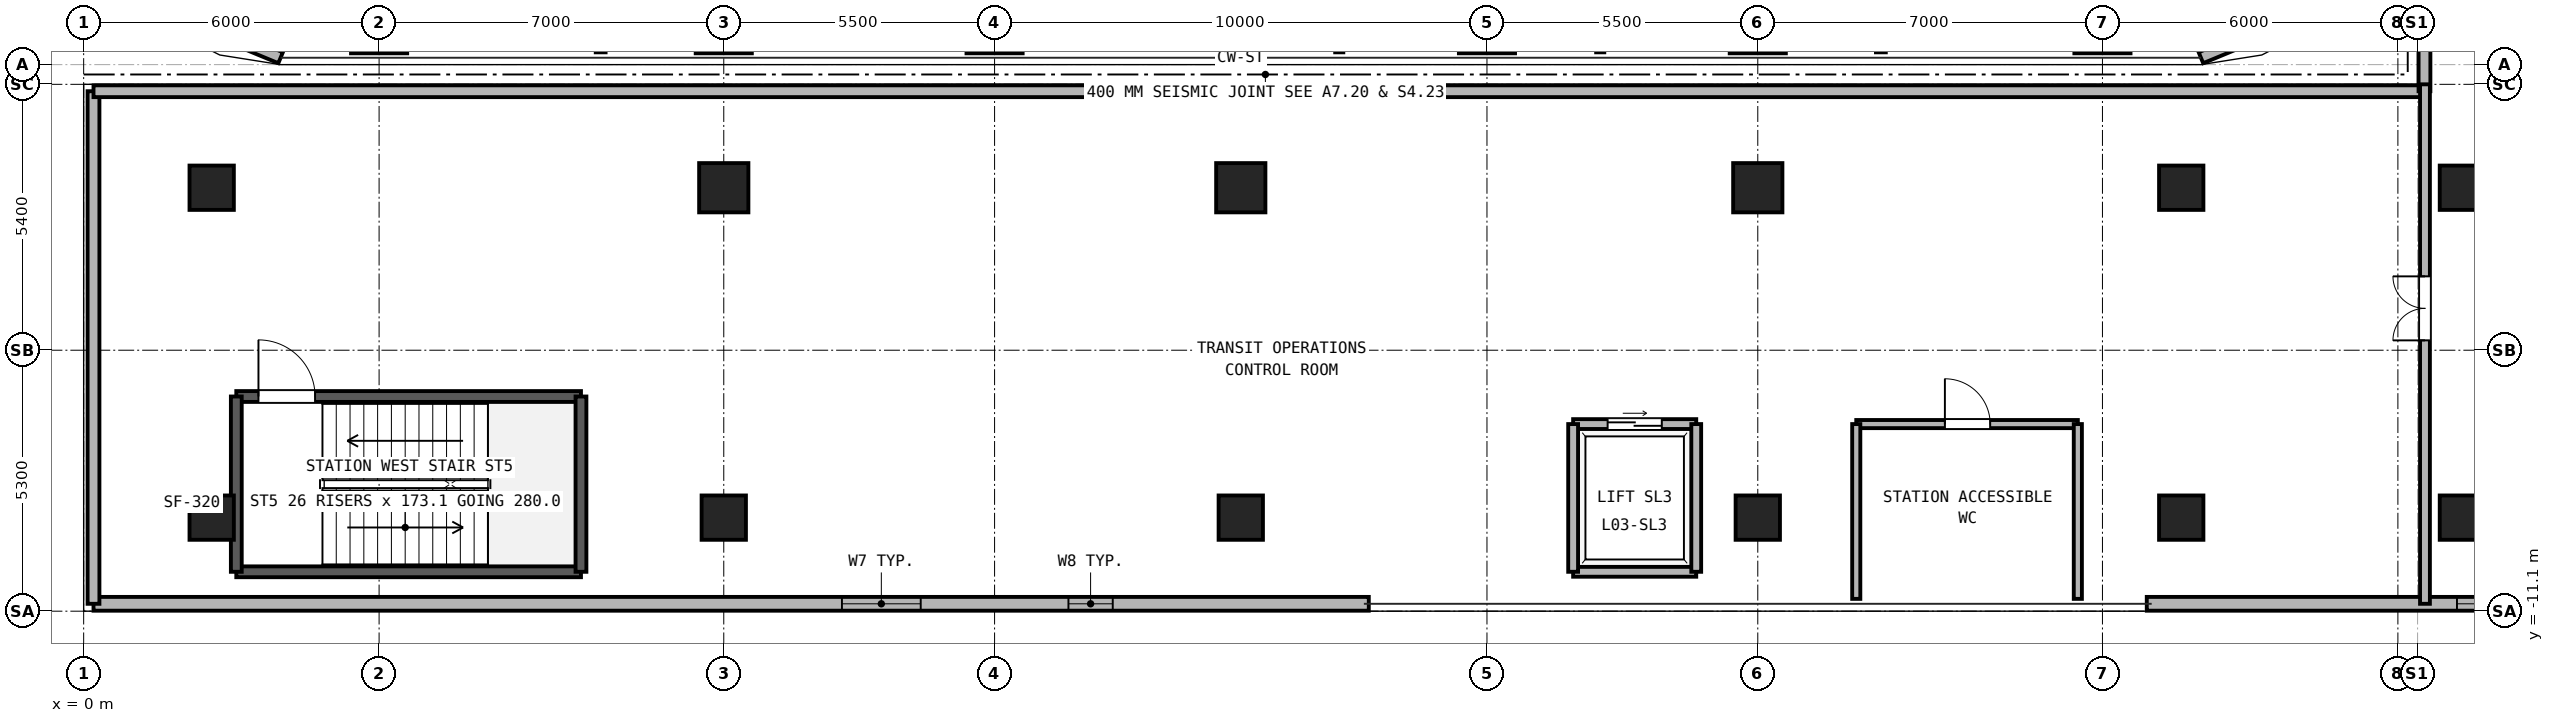
"""IFC4 building model, lengths in metres.
Left out: names, types, materials, properties, quantities, classifications, styles, units other than length and angle.
Written with IfcOpenShell. Run it as: python <this file> out.ifc"""

import sys

from ifc_helpers import new_model, si_unit, direction, frame, frame_2d, origin, origin_2d, place, context, subcontext, project, spatial, rectangle, hollow_rectangle, circle, extrude, source, transform, mapped, element, fill, save


model = new_model("IFC4")
c1 = context("Model", 3, precision=1e-05, world=origin(), true_north=direction((0.0, 1.0)))
c2 = subcontext(c1, "Body", "Model", "MODEL_VIEW")
j1 = project(units=[si_unit("LENGTHUNIT", "METRE"), si_unit("PLANEANGLEUNIT", "RADIAN")], contexts=[c1])
p1 = place(None, origin())
s1 = spatial("IfcSite", under=j1, at=p1, CompositionType="ELEMENT")
p2 = place(p1, origin())
s2 = spatial("IfcBuilding", under=s1, at=p2, CompositionType="ELEMENT")
p3 = place(p2, frame((0.0, 0.0, 13.5)))
s3 = spatial("IfcBuildingStorey", under=s2, at=p3, CompositionType="ELEMENT", Elevation=13.5)
m1 = source(origin(), c2, "Body", "SweptSolid", [
    extrude(hollow_rectangle(XDim=1.14, YDim=1.14, WallThickness=0.07, at=origin_2d()), origin(), (0.0, 0.0, 1.0), 4.18),
])
for number, where, z_axis, x_axis in (
    (1, (6.0, 0.8, 0.0), (0.0, 0.0, 1.0), (1.0, 0.0, 0.0)),
    (2, (13.0, 0.8, 0.0), (0.0, 0.0, 1.0), (1.0, 0.0, 0.0)),
    (3, (18.5, 0.8, 0.0), (0.0, 0.0, 1.0), (1.0, 0.0, 0.0)),
    (4, (28.5, 0.8, 0.0), (0.0, 0.0, 1.0), (1.0, 0.0, 0.0)),
    (5, (34.0, 0.8, 0.0), (0.0, 0.0, 1.0), (1.0, 0.0, 0.0)),
    (6, (41.0, 0.8, 0.0), (0.0, 0.0, 1.0), (1.0, 0.0, 0.0)),
):
    element("IfcColumn", number, at=place(p3, frame(where, z_axis=z_axis, x_axis=x_axis)), inside=s3, PredefinedType="COLUMN", context=c2, shape_type="MappedRepresentation", body=[
        mapped(m1, transform((0.0, 0.0, 0.0), x_axis=(1.0, 0.0, 0.0), y_axis=(0.0, 1.0, 0.0), z_axis=(0.0, 0.0, 1.0), scale=1.0)),
    ])
m2 = source(origin(), c2, "Body", "SweptSolid", [
    extrude(hollow_rectangle(XDim=0.7, YDim=0.9, WallThickness=0.04, at=origin_2d()), origin(), (0.0, 0.0, 1.0), 4.18),
])
for number, where, z_axis, x_axis in (
    (7, (2.6, -9.2, 0.0), (0.0, 0.0, 1.0), (1.0, 0.0, 0.0)),
    (8, (2.6, -2.5, 0.0), (0.0, 0.0, 1.0), (1.0, 0.0, 0.0)),
    (9, (13.0, -9.2, 0.0), (0.0, 0.0, 1.0), (1.0, 0.0, 0.0)),
):
    element("IfcColumn", number, at=place(p3, frame(where, z_axis=z_axis, x_axis=x_axis)), inside=s3, PredefinedType="COLUMN", context=c2, shape_type="MappedRepresentation", body=[
        mapped(m2, transform((0.0, 0.0, 0.0), x_axis=(1.0, 0.0, 0.0), y_axis=(0.0, 1.0, 0.0), z_axis=(0.0, 0.0, 1.0), scale=1.0)),
    ])
m3 = source(origin(), c2, "Body", "SweptSolid", [
    extrude(circle(Radius=0.5, at=origin_2d()), origin(), (0.0, 0.0, 1.0), 4.18),
])
p4 = place(p3, frame((13.0, -2.5, 0.0), z_axis=(0.0, 0.0, 1.0), x_axis=(1.0, 0.0, 0.0)))
e10 = element("IfcColumn", 10, at=p4, inside=s3, PredefinedType="COLUMN", context=c2, shape_type="MappedRepresentation", body=[
    mapped(m3, transform((0.0, 0.0, 0.0), x_axis=(1.0, 0.0, 0.0), y_axis=(0.0, 1.0, 0.0), z_axis=(0.0, 0.0, 1.0), scale=1.0)),
])
p5 = place(p3, frame((23.5, -9.2, 0.0), z_axis=(0.0, 0.0, 1.0), x_axis=(1.0, 0.0, 0.0)))
e11 = element("IfcColumn", 11, at=p5, inside=s3, PredefinedType="COLUMN", context=c2, shape_type="MappedRepresentation", body=[
    mapped(m2, transform((0.0, 0.0, 0.0), x_axis=(1.0, 0.0, 0.0), y_axis=(0.0, 1.0, 0.0), z_axis=(0.0, 0.0, 1.0), scale=1.0)),
])
p6 = place(p3, frame((23.5, -2.5, 0.0), z_axis=(0.0, 0.0, 1.0), x_axis=(1.0, 0.0, 0.0)))
e12 = element("IfcColumn", 12, at=p6, inside=s3, PredefinedType="COLUMN", context=c2, shape_type="MappedRepresentation", body=[
    mapped(m3, transform((0.0, 0.0, 0.0), x_axis=(1.0, 0.0, 0.0), y_axis=(0.0, 1.0, 0.0), z_axis=(0.0, 0.0, 1.0), scale=1.0)),
])
p7 = place(p3, frame((34.0, -9.2, 0.0), z_axis=(0.0, 0.0, 1.0), x_axis=(1.0, 0.0, 0.0)))
e13 = element("IfcColumn", 13, at=p7, inside=s3, PredefinedType="COLUMN", context=c2, shape_type="MappedRepresentation", body=[
    mapped(m2, transform((0.0, 0.0, 0.0), x_axis=(1.0, 0.0, 0.0), y_axis=(0.0, 1.0, 0.0), z_axis=(0.0, 0.0, 1.0), scale=1.0)),
])
p8 = place(p3, frame((34.0, -2.5, 0.0), z_axis=(0.0, 0.0, 1.0), x_axis=(1.0, 0.0, 0.0)))
e14 = element("IfcColumn", 14, at=p8, inside=s3, PredefinedType="COLUMN", context=c2, shape_type="MappedRepresentation", body=[
    mapped(m3, transform((0.0, 0.0, 0.0), x_axis=(1.0, 0.0, 0.0), y_axis=(0.0, 1.0, 0.0), z_axis=(0.0, 0.0, 1.0), scale=1.0)),
])
for number, where, z_axis, x_axis in (
    (15, (42.6, -9.2, 0.0), (0.0, 0.0, 1.0), (1.0, 0.0, 0.0)),
    (16, (42.6, -2.5, 0.0), (0.0, 0.0, 1.0), (1.0, 0.0, 0.0)),
    (17, (48.3, -9.2, 0.0), (0.0, 0.0, 1.0), (1.0, 0.0, 0.0)),
    (18, (48.3, -2.5, 0.0), (0.0, 0.0, 1.0), (1.0, 0.0, 0.0)),
):
    element("IfcColumn", number, at=place(p3, frame(where, z_axis=z_axis, x_axis=x_axis)), inside=s3, PredefinedType="COLUMN", context=c2, shape_type="MappedRepresentation", body=[
        mapped(m2, transform((0.0, 0.0, 0.0), x_axis=(1.0, 0.0, 0.0), y_axis=(0.0, 1.0, 0.0), z_axis=(0.0, 0.0, 1.0), scale=1.0)),
    ])
for number, where, z_axis, x_axis in (
    (19, (43.0, 0.14, 0.0), (0.0, 0.0, 1.0), (0.924, 0.383, 0.0)),
    (20, (1.271, 1.271, 0.0), (0.0, 0.0, 1.0), (0.924, -0.383, 0.0)),
):
    element("IfcWall", number, at=place(p3, frame(where, z_axis=z_axis, x_axis=x_axis)), inside=s3, PredefinedType="SOLIDWALL", context=c2, shape_type="SweptSolid", body=[
        extrude(rectangle(XDim=2.954, YDim=0.24, at=frame_2d((1.477, 0.0))), origin(), (0.0, 0.0, 1.0), 4.18),
    ])
p9 = place(p3, frame((0.2, -10.95, 0.0), z_axis=(0.0, 0.0, 1.0), x_axis=(1.0, 0.0, 0.0)))
e21 = element("IfcWall", 21, at=p9, inside=s3, PredefinedType="SOLIDWALL", context=c2, shape_type="SweptSolid", body=[
    extrude(rectangle(XDim=25.9, YDim=0.28, at=frame_2d((12.95, 0.0))), origin(), (0.0, 0.0, 1.0), 4.18),
])
p10 = place(p9, frame((15.2, 0.0, 1.1)))
e22 = element("IfcOpeningElement", 22, at=p10, cuts=e21, PredefinedType="OPENING", context=c2, shape_type="SweptSolid", body=[
    extrude(rectangle(XDim=1.6, YDim=1.4, at=frame_2d((0.8, 0.7))), frame((0.0, 0.15, 0.0), z_axis=(0.0, -1.0, 0.0), x_axis=(1.0, 0.0, 0.0)), (0.0, 0.0, 1.0), 0.3),
])
p11 = place(p9, frame((19.8, 0.0, 1.1)))
e23 = element("IfcOpeningElement", 23, at=p11, cuts=e21, PredefinedType="OPENING", context=c2, shape_type="SweptSolid", body=[
    extrude(rectangle(XDim=0.9, YDim=1.5, at=frame_2d((0.45, 0.75))), frame((0.0, 0.15, 0.0), z_axis=(0.0, -1.0, 0.0), x_axis=(1.0, 0.0, 0.0)), (0.0, 0.0, 1.0), 0.3),
])
p12 = place(p3, frame((41.9, -10.95, 0.0), z_axis=(0.0, 0.0, 1.0), x_axis=(1.0, 0.0, 0.0)))
e24 = element("IfcWall", 24, at=p12, inside=s3, PredefinedType="SOLIDWALL", context=c2, shape_type="SweptSolid", body=[
    extrude(rectangle(XDim=29.55, YDim=0.28, at=frame_2d((14.775, 0.0))), origin(), (0.0, 0.0, 1.0), 4.18),
])
p13 = place(p12, frame((6.3, 0.0, 1.1)))
e25 = element("IfcOpeningElement", 25, at=p13, cuts=e24, PredefinedType="OPENING", context=c2, shape_type="SweptSolid", body=[
    extrude(rectangle(XDim=1.6, YDim=1.4, at=frame_2d((0.8, 0.7))), frame((0.0, 0.15, 0.0), z_axis=(0.0, -1.0, 0.0), x_axis=(1.0, 0.0, 0.0)), (0.0, 0.0, 1.0), 0.3),
])
p14 = place(p3, frame((0.2, -10.95, 0.0), z_axis=(0.0, 0.0, 1.0), x_axis=(0.0, 1.0, 0.0)))
e26 = element("IfcWall", 26, at=p14, inside=s3, PredefinedType="SOLIDWALL", context=c2, shape_type="SweptSolid", body=[
    extrude(rectangle(XDim=10.41, YDim=0.24, at=frame_2d((5.205, 0.0))), origin(), (0.0, 0.0, 1.0), 4.18),
])
p15 = place(p3, frame((0.2, -0.54, 0.0), z_axis=(0.0, 0.0, 1.0), x_axis=(1.0, 0.0, 0.0)))
e27 = element("IfcWall", 27, at=p15, inside=s3, PredefinedType="SOLIDWALL", context=c2, shape_type="SweptSolid", body=[
    extrude(rectangle(XDim=47.34, YDim=0.24, at=frame_2d((23.67, 0.0))), origin(), (0.0, 0.0, 1.0), 4.18),
])
p16 = place(p3, frame((47.54, -0.54, 0.0), z_axis=(0.0, 0.0, 1.0), x_axis=(0.0, 1.0, 0.0)))
e28 = element("IfcWall", 28, at=p16, inside=s3, PredefinedType="SOLIDWALL", context=c2, shape_type="SweptSolid", body=[
    extrude(rectangle(XDim=40.89, YDim=0.24, at=frame_2d((20.445, 0.0))), origin(), (0.0, 0.0, 1.0), 4.18),
])
p17 = place(p3, frame((3.1, -10.3, 0.0), z_axis=(0.0, 0.0, 1.0), x_axis=(1.0, 0.0, 0.0)))
e29 = element("IfcWall", 29, at=p17, inside=s3, PredefinedType="SOLIDWALL", context=c2, shape_type="SweptSolid", body=[
    extrude(rectangle(XDim=7.0, YDim=0.22, at=frame_2d((3.5, 0.0))), origin(), (0.0, 0.0, 1.0), 4.18),
])
p18 = place(p3, frame((3.1, -6.74, 0.0), z_axis=(0.0, 0.0, 1.0), x_axis=(1.0, 0.0, 0.0)))
e30 = element("IfcWall", 30, at=p18, inside=s3, PredefinedType="SOLIDWALL", context=c2, shape_type="SweptSolid", body=[
    extrude(rectangle(XDim=7.0, YDim=0.22, at=frame_2d((3.5, 0.0))), origin(), (0.0, 0.0, 1.0), 4.18),
])
p19 = place(p18, frame((0.45, 0.0, 0.0)))
e31 = element("IfcOpeningElement", 31, at=p19, cuts=e30, PredefinedType="OPENING", context=c2, shape_type="SweptSolid", body=[
    extrude(rectangle(XDim=1.15, YDim=2.2, at=frame_2d((0.575, 1.1))), frame((0.0, 0.12, 0.0), z_axis=(0.0, -1.0, 0.0), x_axis=(1.0, 0.0, 0.0)), (0.0, 0.0, 1.0), 0.24),
])
for number, where, z_axis, x_axis in (
    (32, (3.1, -10.3, 0.0), (0.0, 0.0, 1.0), (0.0, 1.0, 0.0)),
    (33, (10.1, -10.3, 0.0), (0.0, 0.0, 1.0), (0.0, 1.0, 0.0)),
):
    element("IfcWall", number, at=place(p3, frame(where, z_axis=z_axis, x_axis=x_axis)), inside=s3, PredefinedType="SOLIDWALL", context=c2, shape_type="SweptSolid", body=[
        extrude(rectangle(XDim=3.56, YDim=0.22, at=frame_2d((1.78, 0.0))), origin(), (0.0, 0.0, 1.0), 4.18),
    ])
p20 = place(p3, frame((30.25, -10.3, 0.0), z_axis=(0.0, 0.0, 1.0), x_axis=(1.0, 0.0, 0.0)))
e34 = element("IfcWall", 34, at=p20, inside=s3, PredefinedType="PARTITIONING", context=c2, shape_type="SweptSolid", body=[
    extrude(rectangle(XDim=2.5, YDim=0.2, at=frame_2d((1.25, 0.0))), origin(), (0.0, 0.0, 1.0), 4.18),
])
p21 = place(p3, frame((30.25, -7.3, 0.0), z_axis=(0.0, 0.0, 1.0), x_axis=(1.0, 0.0, 0.0)))
e35 = element("IfcWall", 35, at=p21, inside=s3, PredefinedType="PARTITIONING", context=c2, shape_type="SweptSolid", body=[
    extrude(rectangle(XDim=2.5, YDim=0.2, at=frame_2d((1.25, 0.0))), origin(), (0.0, 0.0, 1.0), 4.18),
])
p22 = place(p21, frame((0.7, 0.0, 0.0)))
e36 = element("IfcOpeningElement", 36, at=p22, cuts=e35, PredefinedType="OPENING", context=c2, shape_type="SweptSolid", body=[
    extrude(rectangle(XDim=1.1, YDim=2.25, at=frame_2d((0.55, 1.125))), frame((0.0, 0.11, 0.0), z_axis=(0.0, -1.0, 0.0), x_axis=(1.0, 0.0, 0.0)), (0.0, 0.0, 1.0), 0.22),
])
for number, where, z_axis, x_axis in (
    (37, (30.25, -10.3, 0.0), (0.0, 0.0, 1.0), (0.0, 1.0, 0.0)),
    (38, (32.75, -10.3, 0.0), (0.0, 0.0, 1.0), (0.0, 1.0, 0.0)),
):
    element("IfcWall", number, at=place(p3, frame(where, z_axis=z_axis, x_axis=x_axis)), inside=s3, PredefinedType="PARTITIONING", context=c2, shape_type="SweptSolid", body=[
        extrude(rectangle(XDim=3.0, YDim=0.2, at=frame_2d((1.5, 0.0))), origin(), (0.0, 0.0, 1.0), 4.18),
    ])
p23 = place(p3, frame((47.55, -10.95, 0.0), z_axis=(0.0, 0.0, 1.0), x_axis=(0.0, 1.0, 0.0)))
e39 = element("IfcWall", 39, at=p23, inside=s3, PredefinedType="PARTITIONING", context=c2, shape_type="SweptSolid", body=[
    extrude(rectangle(XDim=10.55, YDim=0.2, at=frame_2d((5.275, 0.0))), origin(), (0.0, 0.0, 1.0), 4.18),
])
p24 = place(p23, frame((5.35, 0.0, 0.0)))
e40 = element("IfcOpeningElement", 40, at=p24, cuts=e39, PredefinedType="OPENING", context=c2, shape_type="SweptSolid", body=[
    extrude(rectangle(XDim=1.3, YDim=2.2, at=frame_2d((0.65, 1.1))), frame((0.0, 0.11, 0.0), z_axis=(0.0, -1.0, 0.0), x_axis=(1.0, 0.0, 0.0)), (0.0, 0.0, 1.0), 0.22),
])
p25 = place(p3, frame((36.0, -7.3, 0.0), z_axis=(0.0, 0.0, 1.0), x_axis=(1.0, 0.0, 0.0)))
e41 = element("IfcWall", 41, at=p25, inside=s3, PredefinedType="PARTITIONING", context=c2, shape_type="SweptSolid", body=[
    extrude(rectangle(XDim=4.5, YDim=0.165, at=frame_2d((2.25, 0.0))), origin(), (0.0, 0.0, 1.0), 4.18),
])
p26 = place(p25, frame((1.8, 0.0, 0.0)))
e42 = element("IfcOpeningElement", 42, at=p26, cuts=e41, PredefinedType="OPENING", context=c2, shape_type="SweptSolid", body=[
    extrude(rectangle(XDim=0.92, YDim=2.1, at=frame_2d((0.46, 1.05))), frame((0.0, 0.093, 0.0), z_axis=(0.0, -1.0, 0.0), x_axis=(1.0, 0.0, 0.0)), (0.0, 0.0, 1.0), 0.185),
])
for number, where, z_axis, x_axis in (
    (43, (36.0, -10.85, 0.0), (0.0, 0.0, 1.0), (0.0, 1.0, 0.0)),
    (44, (40.5, -10.85, 0.0), (0.0, 0.0, 1.0), (0.0, 1.0, 0.0)),
):
    element("IfcWall", number, at=place(p3, frame(where, z_axis=z_axis, x_axis=x_axis)), inside=s3, PredefinedType="PARTITIONING", context=c2, shape_type="SweptSolid", body=[
        extrude(rectangle(XDim=3.55, YDim=0.165, at=frame_2d((1.775, 0.0))), origin(), (0.0, 0.0, 1.0), 4.18),
    ])
p27 = place(p10, origin())
e45 = element("IfcWindow", 45, at=p27, inside=s3, PartitioningType="SINGLE_PANEL", PredefinedType="WINDOW", context=c2, shape_type="SweptSolid", body=[
    extrude(rectangle(XDim=1.6, YDim=1.4, at=frame_2d((0.8, 0.7))), frame((0.0, 0.03, 0.0), z_axis=(0.0, -1.0, 0.0), x_axis=(1.0, 0.0, 0.0)), (0.0, 0.0, 1.0), 0.06),
])
fill(e22, e45)
p28 = place(p11, origin())
e46 = element("IfcWindow", 46, at=p28, inside=s3, PartitioningType="SINGLE_PANEL", PredefinedType="WINDOW", context=c2, shape_type="SweptSolid", body=[
    extrude(rectangle(XDim=0.9, YDim=1.5, at=frame_2d((0.45, 0.75))), frame((0.0, 0.03, 0.0), z_axis=(0.0, -1.0, 0.0), x_axis=(1.0, 0.0, 0.0)), (0.0, 0.0, 1.0), 0.06),
])
fill(e23, e46)
p29 = place(p13, origin())
e47 = element("IfcWindow", 47, at=p29, inside=s3, PartitioningType="SINGLE_PANEL", PredefinedType="WINDOW", context=c2, shape_type="SweptSolid", body=[
    extrude(rectangle(XDim=1.6, YDim=1.4, at=frame_2d((0.8, 0.7))), frame((0.0, 0.03, 0.0), z_axis=(0.0, -1.0, 0.0), x_axis=(1.0, 0.0, 0.0)), (0.0, 0.0, 1.0), 0.06),
])
fill(e25, e47)
p30 = place(p19, origin())
e48 = element("IfcDoor", 48, at=p30, inside=s3, OperationType="SINGLE_SWING_LEFT", PredefinedType="DOOR", context=c2, shape_type="SweptSolid", body=[
    extrude(rectangle(XDim=1.15, YDim=2.2, at=frame_2d((0.575, 1.1))), frame((0.0, 0.025, 0.0), z_axis=(0.0, -1.0, 0.0), x_axis=(1.0, 0.0, 0.0)), (0.0, 0.0, 1.0), 0.05),
])
fill(e31, e48)
p31 = place(p22, origin())
e49 = element("IfcDoor", 49, at=p31, inside=s3, OperationType="DOUBLE_DOOR_SLIDING", PredefinedType="DOOR", context=c2, shape_type="SweptSolid", body=[
    extrude(rectangle(XDim=1.1, YDim=2.25, at=frame_2d((0.55, 1.125))), frame((0.0, 0.025, 0.0), z_axis=(0.0, -1.0, 0.0), x_axis=(1.0, 0.0, 0.0)), (0.0, 0.0, 1.0), 0.05),
])
fill(e36, e49)
p32 = place(p24, origin())
e50 = element("IfcDoor", 50, at=p32, inside=s3, OperationType="DOUBLE_DOOR_SINGLE_SWING", PredefinedType="DOOR", context=c2, shape_type="SweptSolid", body=[
    extrude(rectangle(XDim=1.3, YDim=2.2, at=frame_2d((0.65, 1.1))), frame((0.0, 0.025, 0.0), z_axis=(0.0, -1.0, 0.0), x_axis=(1.0, 0.0, 0.0)), (0.0, 0.0, 1.0), 0.05),
])
fill(e40, e50)
p33 = place(p26, origin())
e51 = element("IfcDoor", 51, at=p33, inside=s3, OperationType="SINGLE_SWING_LEFT", PredefinedType="DOOR", context=c2, shape_type="SweptSolid", body=[
    extrude(rectangle(XDim=0.92, YDim=2.1, at=frame_2d((0.46, 1.05))), frame((0.0, 0.025, 0.0), z_axis=(0.0, -1.0, 0.0), x_axis=(1.0, 0.0, 0.0)), (0.0, 0.0, 1.0), 0.05),
])
fill(e42, e51)
save(model, sys.argv[1])
